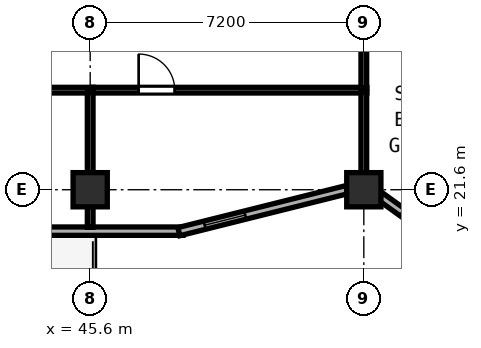
"""IFC4 building model, lengths in metres.
Left out: names, types, materials, properties, quantities, classifications, styles, units other than length and angle.
Written with IfcOpenShell. Run it as: python <this file> out.ifc"""

import sys

from ifc_helpers import new_model, si_unit, direction, frame, frame_2d, origin, origin_2d, place, context, subcontext, project, spatial, rectangle, hollow_rectangle, extrude, element, fill, save


model = new_model("IFC4")
c1 = context("Model", 3, precision=1e-05, world=origin(), true_north=direction((0.0, 1.0)))
c2 = subcontext(c1, "Body", "Model", "MODEL_VIEW")
j1 = project(units=[si_unit("LENGTHUNIT", "METRE"), si_unit("PLANEANGLEUNIT", "RADIAN")], contexts=[c1])
p1 = place(None, origin())
s1 = spatial("IfcSite", under=j1, at=p1, CompositionType="ELEMENT")
p2 = place(p1, origin())
s2 = spatial("IfcBuilding", under=s1, at=p2, CompositionType="ELEMENT")
p3 = place(p2, frame((0.0, 0.0, 199.4)))
s3 = spatial("IfcBuildingStorey", under=s2, at=p3, CompositionType="ELEMENT", Elevation=199.4)
for number, where, z_axis, x_axis in (
    (1, (52.8, 21.6, 0.0), (0.0, 0.0, 1.0), (1.0, 0.0, 0.0)),
    (2, (45.6, 21.6, 0.0), (0.0, 0.0, 1.0), (1.0, 0.0, 0.0)),
):
    element("IfcColumn", number, at=place(p3, frame(where, z_axis=z_axis, x_axis=x_axis)), inside=s3, PredefinedType="COLUMN", context=c2, shape_type="SweptSolid", body=[
        extrude(hollow_rectangle(XDim=0.9, YDim=0.9, WallThickness=0.034, at=origin_2d()), origin(), (0.0, 0.0, 1.0), 3.8),
    ])
p4 = place(p3, frame((28.759, 20.51, 0.0), z_axis=(0.0, 0.0, 1.0), x_axis=(1.0, 0.0, 0.0)))
e3 = element("IfcWall", 3, at=p4, inside=s3, PredefinedType="SOLIDWALL", context=c2, shape_type="SweptSolid", body=[
    extrude(rectangle(XDim=19.283, YDim=0.22, at=frame_2d((9.642, 0.0))), origin(), (0.0, 0.0, 1.0), 3.62),
])
p5 = place(p4, frame((15.641, 0.0, 0.0), z_axis=(0.0, 0.0, 1.0), x_axis=(-1.0, 0.0, 0.0)))
e4 = element("IfcOpeningElement", 4, at=p5, cuts=e3, PredefinedType="OPENING", context=c2, shape_type="SweptSolid", body=[
    extrude(rectangle(XDim=1.2, YDim=2.15, at=frame_2d((0.6, 1.075))), frame((0.0, 0.12, 0.0), z_axis=(0.0, -1.0, 0.0), x_axis=(1.0, 0.0, 0.0)), (0.0, 0.0, 1.0), 0.24),
])
p6 = place(p3, frame((47.933, 20.497, 0.0), z_axis=(0.0, 0.0, 1.0), x_axis=(0.970142500145, 0.242535625036, 0.0)))
e5 = element("IfcWall", 5, at=p6, inside=s3, PredefinedType="SOLIDWALL", context=c2, shape_type="SweptSolid", body=[
    extrude(rectangle(XDim=4.561, YDim=0.22, at=frame_2d((2.281, 0.0))), origin(), (0.0, 0.0, 1.0), 3.215),
])
p7 = place(p6, frame((0.7, 0.0, 0.85)))
e6 = element("IfcOpeningElement", 6, at=p7, cuts=e5, PredefinedType="OPENING", context=c2, shape_type="SweptSolid", body=[
    extrude(rectangle(XDim=1.1, YDim=1.75, at=frame_2d((0.55, 0.875))), frame((0.0, 0.12, 0.0), z_axis=(0.0, -1.0, 0.0), x_axis=(1.0, 0.0, 0.0)), (0.0, 0.0, 1.0), 0.24),
])
p8 = place(p3, frame((53.242, 21.417, 0.0), z_axis=(0.0, 0.0, 1.0), x_axis=(0.811534737332, -0.58430417601, 0.0)))
e7 = element("IfcWall", 7, at=p8, inside=s3, PredefinedType="SOLIDWALL", context=c2, shape_type="SweptSolid", body=[
    extrude(rectangle(XDim=11.697, YDim=0.22, at=frame_2d((5.849, 0.0))), origin(), (0.0, 0.0, 1.0), 3.215),
])
p9 = place(p8, frame((0.7, 0.0, 0.85)))
e8 = element("IfcOpeningElement", 8, at=p9, cuts=e7, PredefinedType="OPENING", context=c2, shape_type="SweptSolid", body=[
    extrude(rectangle(XDim=1.1, YDim=1.75, at=frame_2d((0.55, 0.875))), frame((0.0, 0.12, 0.0), z_axis=(0.0, -1.0, 0.0), x_axis=(1.0, 0.0, 0.0)), (0.0, 0.0, 1.0), 0.24),
])
p10 = place(p8, frame((6.1, 0.0, 0.85)))
e9 = element("IfcOpeningElement", 9, at=p10, cuts=e7, PredefinedType="OPENING", context=c2, shape_type="SweptSolid", body=[
    extrude(rectangle(XDim=1.1, YDim=1.75, at=frame_2d((0.55, 0.875))), frame((0.0, 0.12, 0.0), z_axis=(0.0, -1.0, 0.0), x_axis=(1.0, 0.0, 0.0)), (0.0, 0.0, 1.0), 0.24),
])
p11 = place(p3, frame((38.482, 24.22, 0.0), z_axis=(0.0, 0.0, 1.0), x_axis=(1.0, 0.0, 0.0)))
e10 = element("IfcWall", 10, at=p11, inside=s3, PredefinedType="PARTITIONING", context=c2, shape_type="SweptSolid", body=[
    extrude(rectangle(XDim=7.198, YDim=0.15, at=frame_2d((3.599, 0.0))), origin(), (0.0, 0.0, 1.0), 3.62),
])
p12 = place(p11, frame((3.913, 0.0, 0.0), z_axis=(0.0, 0.0, 1.0), x_axis=(-1.0, 0.0, 0.0)))
e11 = element("IfcOpeningElement", 11, at=p12, cuts=e10, PredefinedType="OPENING", context=c2, shape_type="SweptSolid", body=[
    extrude(rectangle(XDim=0.95, YDim=2.12, at=frame_2d((0.475, 1.06))), frame((0.0, 0.085, 0.0), z_axis=(0.0, -1.0, 0.0), x_axis=(1.0, 0.0, 0.0)), (0.0, 0.0, 1.0), 0.17),
])
p13 = place(p3, frame((45.6, 20.612, 0.0), z_axis=(0.0, 0.0, 1.0), x_axis=(0.0, 1.0, 0.0)))
e12 = element("IfcWall", 12, at=p13, inside=s3, PredefinedType="PARTITIONING", context=c2, shape_type="SweptSolid", body=[
    extrude(rectangle(XDim=3.548, YDim=0.15, at=frame_2d((1.774, 0.0))), origin(), (0.0, 0.0, 1.0), 3.105),
])
p14 = place(p3, frame((45.682, 24.22, 0.0), z_axis=(0.0, 0.0, 1.0), x_axis=(1.0, 0.0, 0.0)))
e13 = element("IfcWall", 13, at=p14, inside=s3, PredefinedType="PARTITIONING", context=c2, shape_type="SweptSolid", body=[
    extrude(rectangle(XDim=7.198, YDim=0.15, at=frame_2d((3.599, 0.0))), origin(), (0.0, 0.0, 1.0), 3.62),
])
p15 = place(p14, frame((2.143, 0.0, 0.0), z_axis=(0.0, 0.0, 1.0), x_axis=(-1.0, 0.0, 0.0)))
e14 = element("IfcOpeningElement", 14, at=p15, cuts=e13, PredefinedType="OPENING", context=c2, shape_type="SweptSolid", body=[
    extrude(rectangle(XDim=0.95, YDim=2.12, at=frame_2d((0.475, 1.06))), frame((0.0, 0.085, 0.0), z_axis=(0.0, -1.0, 0.0), x_axis=(1.0, 0.0, 0.0)), (0.0, 0.0, 1.0), 0.17),
])
p16 = place(p3, frame((52.8, 21.819, 0.0), z_axis=(0.0, 0.0, 1.0), x_axis=(0.0, 1.0, 0.0)))
e15 = element("IfcWall", 15, at=p16, inside=s3, PredefinedType="PARTITIONING", context=c2, shape_type="SweptSolid", body=[
    extrude(rectangle(XDim=2.341, YDim=0.15, at=frame_2d((1.171, 0.0))), origin(), (0.0, 0.0, 1.0), 3.215),
])
p17 = place(p3, frame((52.8, 24.28, 0.0), z_axis=(0.0, 0.0, 1.0), x_axis=(0.0, 1.0, 0.0)))
e16 = element("IfcWall", 16, at=p17, inside=s3, PredefinedType="PARTITIONING", context=c2, shape_type="SweptSolid", body=[
    extrude(rectangle(XDim=2.01, YDim=0.15, at=frame_2d((1.005, 0.0))), origin(), (0.0, 0.0, 1.0), 3.215),
])
p18 = place(p7, origin())
e17 = element("IfcWindow", 17, at=p18, inside=s3, PartitioningType="SINGLE_PANEL", PredefinedType="WINDOW", context=c2, shape_type="SweptSolid", body=[
    extrude(rectangle(XDim=1.1, YDim=1.75, at=frame_2d((0.55, 0.875))), frame((0.0, 0.03, 0.0), z_axis=(0.0, -1.0, 0.0), x_axis=(1.0, 0.0, 0.0)), (0.0, 0.0, 1.0), 0.06),
])
fill(e6, e17)
p19 = place(p9, origin())
e18 = element("IfcWindow", 18, at=p19, inside=s3, PartitioningType="SINGLE_PANEL", PredefinedType="WINDOW", context=c2, shape_type="SweptSolid", body=[
    extrude(rectangle(XDim=1.1, YDim=1.75, at=frame_2d((0.55, 0.875))), frame((0.0, 0.03, 0.0), z_axis=(0.0, -1.0, 0.0), x_axis=(1.0, 0.0, 0.0)), (0.0, 0.0, 1.0), 0.06),
])
fill(e8, e18)
p20 = place(p15, origin())
e19 = element("IfcDoor", 19, at=p20, inside=s3, OperationType="SINGLE_SWING_RIGHT", PredefinedType="DOOR", context=c2, shape_type="SweptSolid", body=[
    extrude(rectangle(XDim=0.95, YDim=2.12, at=frame_2d((0.475, 1.06))), frame((0.0, 0.025, 0.0), z_axis=(0.0, -1.0, 0.0), x_axis=(1.0, 0.0, 0.0)), (0.0, 0.0, 1.0), 0.05),
])
fill(e14, e19)
save(model, sys.argv[1])
